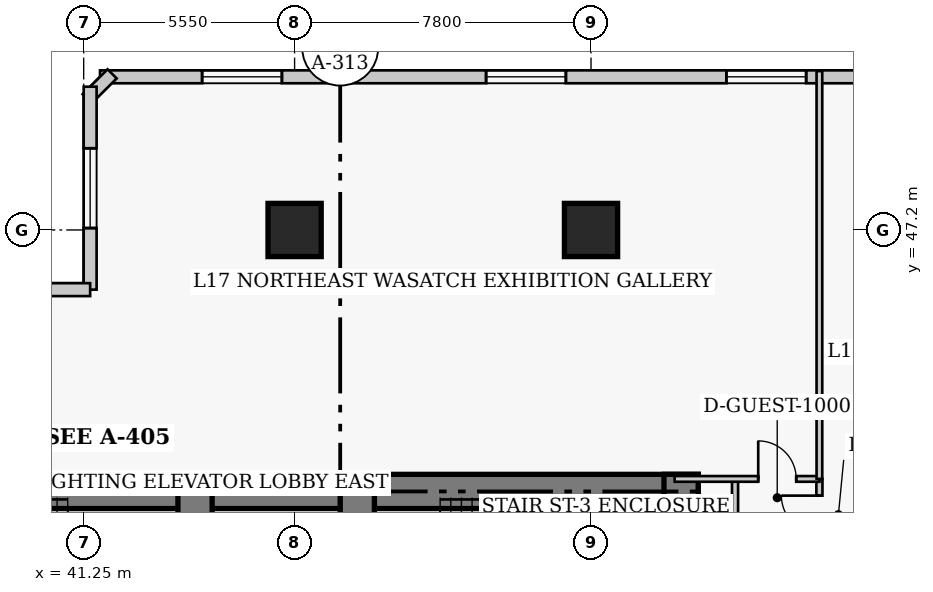
"""IFC4 building model, lengths in metres.
Left out: names, types, materials, properties, quantities, classifications, styles, units other than length and angle.
Written with IfcOpenShell. Run it as: python <this file> out.ifc"""

import sys

from ifc_helpers import new_model, si_unit, direction, frame, frame_2d, origin, origin_2d, place, context, subcontext, project, spatial, rectangle, extrude, element, fill, save


model = new_model("IFC4")
c1 = context("Model", 3, precision=1e-05, world=origin(), true_north=direction((0.0, 1.0)))
c2 = subcontext(c1, "Body", "Model", "MODEL_VIEW")
j1 = project(units=[si_unit("LENGTHUNIT", "METRE"), si_unit("PLANEANGLEUNIT", "RADIAN")], contexts=[c1])
p1 = place(None, origin())
s1 = spatial("IfcSite", under=j1, at=p1, CompositionType="ELEMENT")
p2 = place(p1, origin())
s2 = spatial("IfcBuilding", under=s1, at=p2, CompositionType="ELEMENT")
p3 = place(p2, frame((0.0, 0.0, 71.6)))
s3 = spatial("IfcBuildingStorey", under=s2, at=p3, CompositionType="ELEMENT", Elevation=71.6)
p4 = place(p3, frame((35.85, 40.32, 0.0), z_axis=(0.0, 0.0, 1.0), x_axis=(1.0, 0.0, 0.0)))
e1 = element("IfcWall", 1, at=p4, inside=s3, PredefinedType="SHEAR", context=c2, shape_type="SweptSolid", body=[
    extrude(rectangle(XDim=12.6, YDim=0.9, at=frame_2d((6.3, 0.0))), origin(), (0.0, 0.0, 1.0), 3.8),
])
p5 = place(p3, frame((48.45, 40.32, 0.0), z_axis=(0.0, 0.0, 1.0), x_axis=(1.0, 0.0, 0.0)))
e2 = element("IfcWall", 2, at=p5, inside=s3, PredefinedType="SHEAR", context=c2, shape_type="SweptSolid", body=[
    extrude(rectangle(XDim=8.97, YDim=0.9, at=frame_2d((4.485, 0.0))), origin(), (0.0, 0.0, 1.0), 3.8),
])
p6 = place(p3, frame((56.97, 27.05, 0.0), z_axis=(0.0, 0.0, 1.0), x_axis=(0.0, 1.0, 0.0)))
e3 = element("IfcWall", 3, at=p6, inside=s3, PredefinedType="SHEAR", context=c2, shape_type="SweptSolid", body=[
    extrude(rectangle(XDim=13.72, YDim=0.9, at=frame_2d((6.86, 0.0))), origin(), (0.0, 0.0, 1.0), 3.8),
])
p7 = place(p3, frame((44.18, 36.37, 0.0), z_axis=(0.0, 0.0, 1.0), x_axis=(0.0, 1.0, 0.0)))
e4 = element("IfcWall", 4, at=p7, inside=s3, PredefinedType="SHEAR", context=c2, shape_type="SweptSolid", body=[
    extrude(rectangle(XDim=3.95, YDim=0.9, at=frame_2d((1.975, 0.0))), origin(), (0.0, 0.0, 1.0), 3.8),
])
p8 = place(p3, frame((48.45, 32.3, 0.0), z_axis=(0.0, 0.0, 1.0), x_axis=(0.0, 1.0, 0.0)))
e5 = element("IfcWall", 5, at=p8, inside=s3, PredefinedType="SHEAR", context=c2, shape_type="SweptSolid", body=[
    extrude(rectangle(XDim=8.02, YDim=0.9, at=frame_2d((4.01, 0.0))), origin(), (0.0, 0.0, 1.0), 3.8),
])
p9 = place(p8, frame((5.9, 0.0, 0.0)))
e6 = element("IfcOpeningElement", 6, at=p9, cuts=e5, PredefinedType="OPENING", context=c2, shape_type="SweptSolid", body=[
    extrude(rectangle(XDim=1.1, YDim=2.15, at=frame_2d((0.55, 1.075))), frame((0.0, 0.46, 0.0), z_axis=(0.0, -1.0, 0.0), x_axis=(1.0, 0.0, 0.0)), (0.0, 0.0, 1.0), 0.92),
])
for number, where, z_axis, x_axis in (
    (7, (46.8, 47.2, 0.0), (0.0, 0.0, 1.0), (1.0, 0.0, 0.0)),
    (8, (54.6, 47.2, 0.0), (0.0, 0.0, 1.0), (1.0, 0.0, 0.0)),
):
    element("IfcColumn", number, at=place(p3, frame(where, z_axis=z_axis, x_axis=x_axis)), inside=s3, PredefinedType="COLUMN", context=c2, shape_type="SweptSolid", body=[
        extrude(rectangle(XDim=1.4, YDim=1.4, at=origin_2d()), origin(), (0.0, 0.0, 1.0), 3.8),
    ])
p10 = place(p3, frame((71.57, 51.23, 0.0), z_axis=(0.0, 0.0, 1.0), x_axis=(-1.0, 0.0, 0.0)))
e9 = element("IfcWall", 9, at=p10, inside=s3, PredefinedType="SOLIDWALL", context=c2, shape_type="SweptSolid", body=[
    extrude(rectangle(XDim=29.89, YDim=0.34, at=frame_2d((14.945, 0.0))), origin(), (0.0, 0.0, 1.0), 3.42),
])
p11 = place(p10, frame((2.686, 0.0, 0.85)))
e10 = element("IfcOpeningElement", 10, at=p11, cuts=e9, PredefinedType="OPENING", context=c2, shape_type="SweptSolid", body=[
    extrude(rectangle(XDim=2.1, YDim=1.85, at=frame_2d((1.05, 0.925))), frame((0.0, 0.18, 0.0), z_axis=(0.0, -1.0, 0.0), x_axis=(1.0, 0.0, 0.0)), (0.0, 0.0, 1.0), 0.36),
])
p12 = place(p10, frame((11.309, 0.0, 0.85)))
e11 = element("IfcOpeningElement", 11, at=p12, cuts=e9, PredefinedType="OPENING", context=c2, shape_type="SweptSolid", body=[
    extrude(rectangle(XDim=2.1, YDim=1.85, at=frame_2d((1.05, 0.925))), frame((0.0, 0.18, 0.0), z_axis=(0.0, -1.0, 0.0), x_axis=(1.0, 0.0, 0.0)), (0.0, 0.0, 1.0), 0.36),
])
p13 = place(p10, frame((17.631, 0.0, 0.85)))
e12 = element("IfcOpeningElement", 12, at=p13, cuts=e9, PredefinedType="OPENING", context=c2, shape_type="SweptSolid", body=[
    extrude(rectangle(XDim=2.1, YDim=1.85, at=frame_2d((1.05, 0.925))), frame((0.0, 0.18, 0.0), z_axis=(0.0, -1.0, 0.0), x_axis=(1.0, 0.0, 0.0)), (0.0, 0.0, 1.0), 0.36),
])
p14 = place(p10, frame((25.104, 0.0, 0.85)))
e13 = element("IfcOpeningElement", 13, at=p14, cuts=e9, PredefinedType="OPENING", context=c2, shape_type="SweptSolid", body=[
    extrude(rectangle(XDim=2.1, YDim=1.85, at=frame_2d((1.05, 0.925))), frame((0.0, 0.18, 0.0), z_axis=(0.0, -1.0, 0.0), x_axis=(1.0, 0.0, 0.0)), (0.0, 0.0, 1.0), 0.36),
])
p15 = place(p3, frame((41.999, 51.308, 0.0), z_axis=(0.0, 0.0, 1.0), x_axis=(-0.707238225886, -0.706975312048, 0.0)))
e14 = element("IfcWall", 14, at=p15, inside=s3, PredefinedType="SOLIDWALL", context=c2, shape_type="SweptSolid", body=[
    extrude(rectangle(XDim=0.929, YDim=0.34, at=frame_2d((0.464, 0.0))), origin(), (0.0, 0.0, 1.0), 3.42),
])
p16 = place(p3, frame((41.42, 50.97, 0.0), z_axis=(0.0, 0.0, 1.0), x_axis=(0.0, -1.0, 0.0)))
e15 = element("IfcWall", 15, at=p16, inside=s3, PredefinedType="SOLIDWALL", context=c2, shape_type="SweptSolid", body=[
    extrude(rectangle(XDim=5.34, YDim=0.34, at=frame_2d((2.67, 0.0))), origin(), (0.0, 0.0, 1.0), 3.42),
])
p17 = place(p16, frame((1.62, 0.0, 0.85)))
e16 = element("IfcOpeningElement", 16, at=p17, cuts=e15, PredefinedType="OPENING", context=c2, shape_type="SweptSolid", body=[
    extrude(rectangle(XDim=2.1, YDim=1.85, at=frame_2d((1.05, 0.925))), frame((0.0, 0.18, 0.0), z_axis=(0.0, -1.0, 0.0), x_axis=(1.0, 0.0, 0.0)), (0.0, 0.0, 1.0), 0.36),
])
p18 = place(p3, frame((41.42, 45.63, 0.0), z_axis=(0.0, 0.0, 1.0), x_axis=(-1.0, 0.0, 0.0)))
e17 = element("IfcWall", 17, at=p18, inside=s3, PredefinedType="SOLIDWALL", context=c2, shape_type="SweptSolid", body=[
    extrude(rectangle(XDim=4.84, YDim=0.34, at=frame_2d((2.42, 0.0))), origin(), (0.0, 0.0, 1.0), 3.42),
])
p19 = place(p18, frame((1.37, 0.0, 0.85)))
e18 = element("IfcOpeningElement", 18, at=p19, cuts=e17, PredefinedType="OPENING", context=c2, shape_type="SweptSolid", body=[
    extrude(rectangle(XDim=2.1, YDim=1.85, at=frame_2d((1.05, 0.925))), frame((0.0, 0.18, 0.0), z_axis=(0.0, -1.0, 0.0), x_axis=(1.0, 0.0, 0.0)), (0.0, 0.0, 1.0), 0.36),
])
p20 = place(p3, frame((60.61, 10.25, 0.0), z_axis=(0.0, 0.0, 1.0), x_axis=(0.0, 1.0, 0.0)))
e19 = element("IfcWall", 19, at=p20, inside=s3, PredefinedType="PARTITIONING", context=c2, shape_type="SweptSolid", body=[
    extrude(rectangle(XDim=30.4, YDim=0.16, at=frame_2d((15.2, 0.0))), origin(), (0.0, 0.0, 1.0), 3.42),
])
p21 = place(p20, frame((4.4, 0.0, 0.0)))
e20 = element("IfcOpeningElement", 20, at=p21, cuts=e19, PredefinedType="OPENING", context=c2, shape_type="SweptSolid", body=[
    extrude(rectangle(XDim=0.95, YDim=2.1, at=frame_2d((0.475, 1.05))), frame((0.0, 0.09, 0.0), z_axis=(0.0, -1.0, 0.0), x_axis=(1.0, 0.0, 0.0)), (0.0, 0.0, 1.0), 0.18),
])
p22 = place(p20, frame((13.675, 0.0, 0.0)))
e21 = element("IfcOpeningElement", 21, at=p22, cuts=e19, PredefinedType="OPENING", context=c2, shape_type="SweptSolid", body=[
    extrude(rectangle(XDim=0.95, YDim=2.1, at=frame_2d((0.475, 1.05))), frame((0.0, 0.09, 0.0), z_axis=(0.0, -1.0, 0.0), x_axis=(1.0, 0.0, 0.0)), (0.0, 0.0, 1.0), 0.18),
])
p23 = place(p20, frame((22.125, 0.0, 0.0)))
e22 = element("IfcOpeningElement", 22, at=p23, cuts=e19, PredefinedType="OPENING", context=c2, shape_type="SweptSolid", body=[
    extrude(rectangle(XDim=0.95, YDim=2.1, at=frame_2d((0.475, 1.05))), frame((0.0, 0.09, 0.0), z_axis=(0.0, -1.0, 0.0), x_axis=(1.0, 0.0, 0.0)), (0.0, 0.0, 1.0), 0.18),
])
p24 = place(p20, frame((28.96, 0.0, 0.0)))
e23 = element("IfcOpeningElement", 23, at=p24, cuts=e19, PredefinedType="OPENING", context=c2, shape_type="SweptSolid", body=[
    extrude(rectangle(XDim=1.0, YDim=2.15, at=frame_2d((0.5, 1.075))), frame((0.0, 0.09, 0.0), z_axis=(0.0, -1.0, 0.0), x_axis=(1.0, 0.0, 0.0)), (0.0, 0.0, 1.0), 0.18),
])
p25 = place(p3, frame((58.39, 24.91, 0.0), z_axis=(0.0, 0.0, 1.0), x_axis=(0.0, 1.0, 0.0)))
e24 = element("IfcWall", 24, at=p25, inside=s3, PredefinedType="PARTITIONING", context=c2, shape_type="SweptSolid", body=[
    extrude(rectangle(XDim=15.74, YDim=0.16, at=frame_2d((7.87, 0.0))), origin(), (0.0, 0.0, 1.0), 3.42),
])
p26 = place(p3, frame((56.8, 40.65, 0.0), z_axis=(0.0, 0.0, 1.0), x_axis=(1.0, 0.0, 0.0)))
e25 = element("IfcWall", 25, at=p26, inside=s3, PredefinedType="PARTITIONING", context=c2, shape_type="SweptSolid", body=[
    extrude(rectangle(XDim=3.81, YDim=0.15, at=frame_2d((1.905, 0.0))), origin(), (0.0, 0.0, 1.0), 3.42),
])
p27 = place(p26, frame((2.2, 0.0, 0.0)))
e26 = element("IfcOpeningElement", 26, at=p27, cuts=e25, PredefinedType="OPENING", context=c2, shape_type="SweptSolid", body=[
    extrude(rectangle(XDim=1.0, YDim=2.15, at=frame_2d((0.5, 1.075))), frame((0.0, 0.085, 0.0), z_axis=(0.0, -1.0, 0.0), x_axis=(1.0, 0.0, 0.0)), (0.0, 0.0, 1.0), 0.17),
])
p28 = place(p3, frame((60.61, 40.65, 0.0), z_axis=(0.0, 0.0, 1.0), x_axis=(0.0, 1.0, 0.0)))
e27 = element("IfcWall", 27, at=p28, inside=s3, PredefinedType="PARTITIONING", context=c2, shape_type="SweptSolid", body=[
    extrude(rectangle(XDim=10.73, YDim=0.15, at=frame_2d((5.365, 0.0))), origin(), (0.0, 0.0, 1.0), 3.42),
])
p29 = place(p12, origin())
e28 = element("IfcWindow", 28, at=p29, inside=s3, PartitioningType="SINGLE_PANEL", PredefinedType="WINDOW", context=c2, shape_type="SweptSolid", body=[
    extrude(rectangle(XDim=2.1, YDim=1.85, at=frame_2d((1.05, 0.925))), frame((0.0, 0.03, 0.0), z_axis=(0.0, -1.0, 0.0), x_axis=(1.0, 0.0, 0.0)), (0.0, 0.0, 1.0), 0.06),
])
fill(e11, e28)
p30 = place(p13, origin())
e29 = element("IfcWindow", 29, at=p30, inside=s3, PartitioningType="SINGLE_PANEL", PredefinedType="WINDOW", context=c2, shape_type="SweptSolid", body=[
    extrude(rectangle(XDim=2.1, YDim=1.85, at=frame_2d((1.05, 0.925))), frame((0.0, 0.03, 0.0), z_axis=(0.0, -1.0, 0.0), x_axis=(1.0, 0.0, 0.0)), (0.0, 0.0, 1.0), 0.06),
])
fill(e12, e29)
p31 = place(p14, origin())
e30 = element("IfcWindow", 30, at=p31, inside=s3, PartitioningType="SINGLE_PANEL", PredefinedType="WINDOW", context=c2, shape_type="SweptSolid", body=[
    extrude(rectangle(XDim=2.1, YDim=1.85, at=frame_2d((1.05, 0.925))), frame((0.0, 0.03, 0.0), z_axis=(0.0, -1.0, 0.0), x_axis=(1.0, 0.0, 0.0)), (0.0, 0.0, 1.0), 0.06),
])
fill(e13, e30)
p32 = place(p17, origin())
e31 = element("IfcWindow", 31, at=p32, inside=s3, PartitioningType="SINGLE_PANEL", PredefinedType="WINDOW", context=c2, shape_type="SweptSolid", body=[
    extrude(rectangle(XDim=2.1, YDim=1.85, at=frame_2d((1.05, 0.925))), frame((0.0, 0.03, 0.0), z_axis=(0.0, -1.0, 0.0), x_axis=(1.0, 0.0, 0.0)), (0.0, 0.0, 1.0), 0.06),
])
fill(e16, e31)
p33 = place(p27, origin())
e32 = element("IfcDoor", 32, at=p33, inside=s3, OperationType="SINGLE_SWING_LEFT", PredefinedType="DOOR", context=c2, shape_type="SweptSolid", body=[
    extrude(rectangle(XDim=1.0, YDim=2.15, at=frame_2d((0.5, 1.075))), frame((0.0, 0.025, 0.0), z_axis=(0.0, -1.0, 0.0), x_axis=(1.0, 0.0, 0.0)), (0.0, 0.0, 1.0), 0.05),
])
fill(e26, e32)
p34 = place(p24, origin())
e33 = element("IfcDoor", 33, at=p34, inside=s3, OperationType="SINGLE_SWING_RIGHT", PredefinedType="DOOR", context=c2, shape_type="SweptSolid", body=[
    extrude(rectangle(XDim=1.0, YDim=2.15, at=frame_2d((0.5, 1.075))), frame((0.0, 0.025, 0.0), z_axis=(0.0, -1.0, 0.0), x_axis=(1.0, 0.0, 0.0)), (0.0, 0.0, 1.0), 0.05),
])
fill(e23, e33)
save(model, sys.argv[1])
